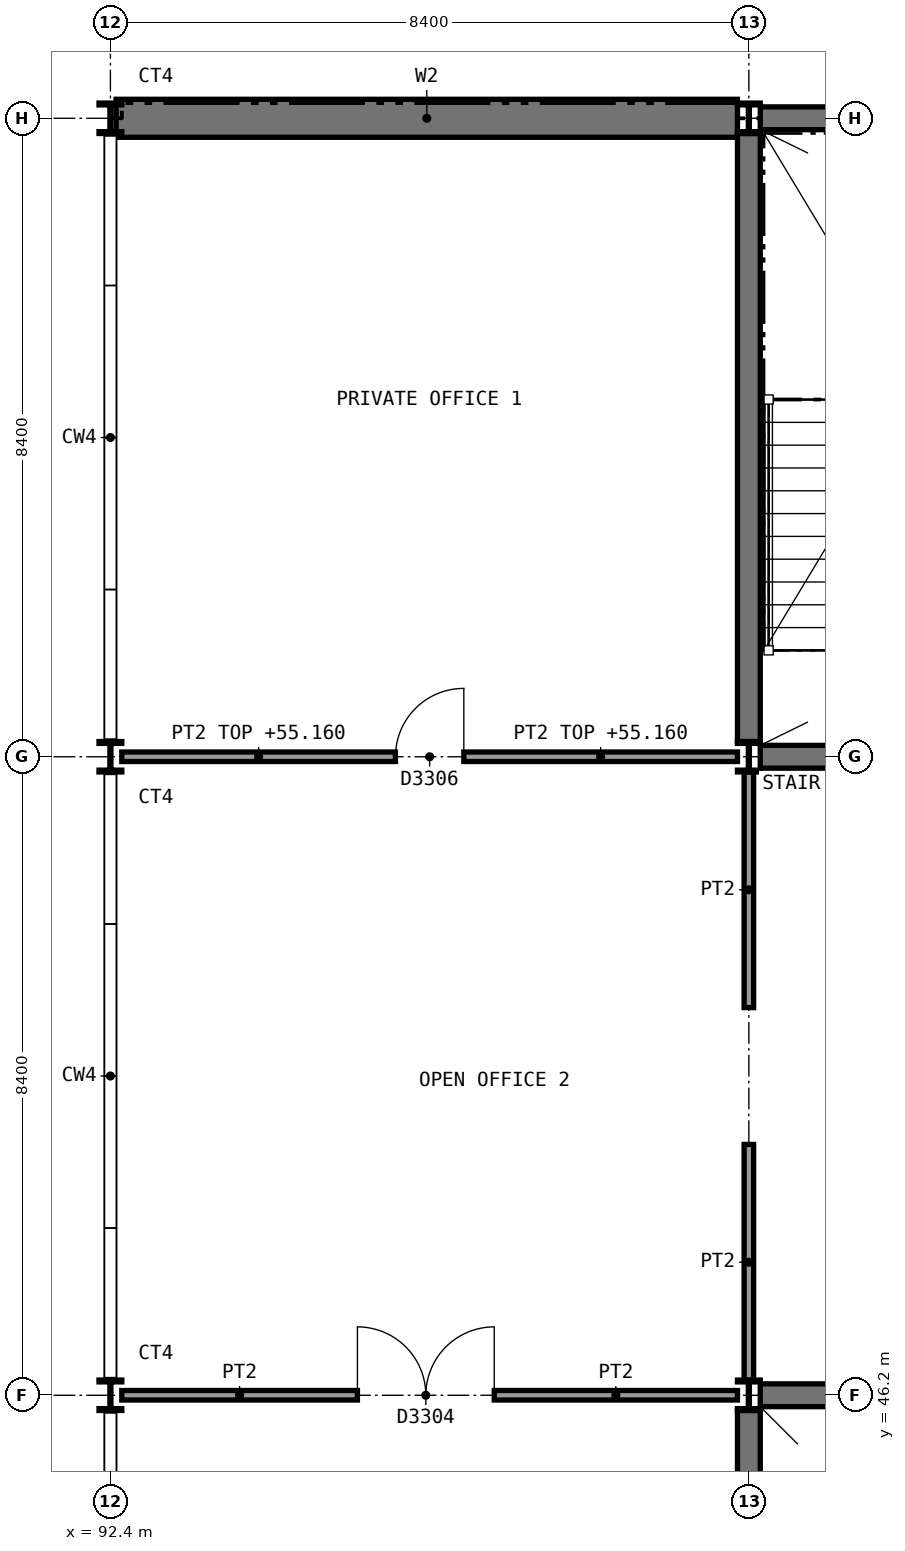
"""IFC4 building model, lengths in metres.
Left out: names, types, materials, properties, quantities, classifications, styles, units other than length and angle.
Written with IfcOpenShell. Run it as: python <this file> out.ifc"""

import sys

from ifc_helpers import new_model, si_unit, direction, frame, frame_2d, origin, origin_2d, place, context, subcontext, project, spatial, rectangle, i_section, extrude, element, fill, save


model = new_model("IFC4")
c1 = context("Model", 3, precision=1e-05, world=origin(), true_north=direction((0.0, 1.0)))
c2 = subcontext(c1, "Body", "Model", "MODEL_VIEW")
j1 = project(units=[si_unit("LENGTHUNIT", "METRE"), si_unit("PLANEANGLEUNIT", "RADIAN")], contexts=[c1])
p1 = place(None, origin())
s1 = spatial("IfcSite", under=j1, at=p1, CompositionType="ELEMENT")
p2 = place(p1, origin())
s2 = spatial("IfcBuilding", under=s1, at=p2, CompositionType="ELEMENT")
p3 = place(p2, frame((0.0, 0.0, 51.6)))
s3 = spatial("IfcBuildingStorey", under=s2, at=p3, CompositionType="ELEMENT", Elevation=51.6)
p4 = place(p3, frame((92.475, 63.0, 0.0), z_axis=(0.0, 0.0, 1.0), x_axis=(1.0, 0.0, 0.0)))
e1 = element("IfcWall", 1, at=p4, inside=s3, PredefinedType="SHEAR", context=c2, shape_type="SweptSolid", body=[
    extrude(rectangle(XDim=8.175, YDim=0.5, at=frame_2d((4.088, 0.0))), origin(), (0.0, 0.0, 1.0), 3.85),
])
p5 = place(p3, frame((100.95, 63.0, 0.0), z_axis=(0.0, 0.0, 1.0), x_axis=(1.0, 0.0, 0.0)))
e2 = element("IfcWall", 2, at=p5, inside=s3, PredefinedType="SHEAR", context=c2, shape_type="SweptSolid", body=[
    extrude(rectangle(XDim=16.45, YDim=0.3, at=frame_2d((8.225, 0.0))), origin(), (0.0, 0.0, 1.0), 3.85),
])
p6 = place(p3, frame((100.95, 54.6, 0.0), z_axis=(0.0, 0.0, 1.0), x_axis=(1.0, 0.0, 0.0)))
e3 = element("IfcWall", 3, at=p6, inside=s3, PredefinedType="SHEAR", context=c2, shape_type="SweptSolid", body=[
    extrude(rectangle(XDim=16.45, YDim=0.3, at=frame_2d((8.225, 0.0))), origin(), (0.0, 0.0, 1.0), 3.85),
])
p7 = place(p6, frame((1.15, 0.0, 0.0)))
e4 = element("IfcOpeningElement", 4, at=p7, cuts=e3, PredefinedType="OPENING", context=c2, shape_type="SweptSolid", body=[
    extrude(rectangle(XDim=1.8, YDim=2.1, at=frame_2d((0.9, 1.05))), frame((0.0, 0.16, 0.0), z_axis=(0.0, -1.0, 0.0), x_axis=(1.0, 0.0, 0.0)), (0.0, 0.0, 1.0), 0.32),
])
p8 = place(p6, frame((13.55, 0.0, 0.0)))
e5 = element("IfcOpeningElement", 5, at=p8, cuts=e3, PredefinedType="OPENING", context=c2, shape_type="SweptSolid", body=[
    extrude(rectangle(XDim=1.8, YDim=2.1, at=frame_2d((0.9, 1.05))), frame((0.0, 0.16, 0.0), z_axis=(0.0, -1.0, 0.0), x_axis=(1.0, 0.0, 0.0)), (0.0, 0.0, 1.0), 0.32),
])
p9 = place(p6, frame((7.05, 0.0, 0.0)))
e6 = element("IfcOpeningElement", 6, at=p9, cuts=e3, PredefinedType="OPENING", context=c2, shape_type="SweptSolid", body=[
    extrude(rectangle(XDim=2.4, YDim=2.4, at=frame_2d((1.2, 1.2))), frame((0.0, 0.16, 0.0), z_axis=(0.0, -1.0, 0.0), x_axis=(1.0, 0.0, 0.0)), (0.0, 0.0, 1.0), 0.32),
])
p10 = place(p3, frame((100.8, 54.8, 0.0), z_axis=(0.0, 0.0, 1.0), x_axis=(0.0, 1.0, 0.0)))
e7 = element("IfcWall", 7, at=p10, inside=s3, PredefinedType="SHEAR", context=c2, shape_type="SweptSolid", body=[
    extrude(rectangle(XDim=8.0, YDim=0.3, at=frame_2d((4.0, 0.0))), origin(), (0.0, 0.0, 1.0), 3.85),
])
p11 = place(p3, frame((100.95, 46.2, 0.0), z_axis=(0.0, 0.0, 1.0), x_axis=(1.0, 0.0, 0.0)))
e8 = element("IfcWall", 8, at=p11, inside=s3, PredefinedType="SHEAR", context=c2, shape_type="SweptSolid", body=[
    extrude(rectangle(XDim=8.1, YDim=0.3, at=frame_2d((4.05, 0.0))), origin(), (0.0, 0.0, 1.0), 3.85),
])
p12 = place(p11, frame((1.15, 0.0, 0.0)))
e9 = element("IfcOpeningElement", 9, at=p12, cuts=e8, PredefinedType="OPENING", context=c2, shape_type="SweptSolid", body=[
    extrude(rectangle(XDim=1.8, YDim=2.1, at=frame_2d((0.9, 1.05))), frame((0.0, 0.16, 0.0), z_axis=(0.0, -1.0, 0.0), x_axis=(1.0, 0.0, 0.0)), (0.0, 0.0, 1.0), 0.32),
])
p13 = place(p11, frame((5.6, 0.0, 0.0)))
e10 = element("IfcOpeningElement", 10, at=p13, cuts=e8, PredefinedType="OPENING", context=c2, shape_type="SweptSolid", body=[
    extrude(rectangle(XDim=1.2, YDim=2.1, at=frame_2d((0.6, 1.05))), frame((0.0, 0.16, 0.0), z_axis=(0.0, -1.0, 0.0), x_axis=(1.0, 0.0, 0.0)), (0.0, 0.0, 1.0), 0.32),
])
p14 = place(p3, frame((100.8, 38.0, 0.0), z_axis=(0.0, 0.0, 1.0), x_axis=(0.0, 1.0, 0.0)))
e11 = element("IfcWall", 11, at=p14, inside=s3, PredefinedType="SHEAR", context=c2, shape_type="SweptSolid", body=[
    extrude(rectangle(XDim=8.0, YDim=0.3, at=frame_2d((4.0, 0.0))), origin(), (0.0, 0.0, 1.0), 3.85),
])
for number, where, z_axis, x_axis in (
    (12, (92.4, 46.2, 0.0), (0.0, 0.0, 1.0), (1.0, 0.0, 0.0)),
    (13, (92.4, 54.6, 0.0), (0.0, 0.0, 1.0), (1.0, 0.0, 0.0)),
    (14, (92.4, 63.0, 0.0), (0.0, 0.0, 1.0), (1.0, 0.0, 0.0)),
    (15, (100.8, 46.2, 0.0), (0.0, 0.0, 1.0), (1.0, 0.0, 0.0)),
    (16, (100.8, 54.6, 0.0), (0.0, 0.0, 1.0), (1.0, 0.0, 0.0)),
    (17, (100.8, 63.0, 0.0), (0.0, 0.0, 1.0), (1.0, 0.0, 0.0)),
):
    element("IfcColumn", number, at=place(p3, frame(where, z_axis=z_axis, x_axis=x_axis)), inside=s3, PredefinedType="COLUMN", context=c2, shape_type="SweptSolid", body=[
        extrude(i_section(OverallWidth=0.3, OverallDepth=0.4, WebThickness=0.013, FlangeThickness=0.024, FilletRadius=0.027, at=origin_2d()), origin(), (0.0, 0.0, 1.0), 4.0),
    ])
p15 = place(p3, frame((92.55, 46.2, 0.0), z_axis=(0.0, 0.0, 1.0), x_axis=(1.0, 0.0, 0.0)))
e18 = element("IfcWall", 18, at=p15, inside=s3, PredefinedType="PARTITIONING", context=c2, shape_type="SweptSolid", body=[
    extrude(rectangle(XDim=8.1, YDim=0.125, at=frame_2d((4.05, 0.0))), origin(), (0.0, 0.0, 1.0), 3.5),
])
p16 = place(p15, frame((3.1, 0.0, 0.0)))
e19 = element("IfcOpeningElement", 19, at=p16, cuts=e18, PredefinedType="OPENING", context=c2, shape_type="SweptSolid", body=[
    extrude(rectangle(XDim=1.8, YDim=2.1, at=frame_2d((0.9, 1.05))), frame((0.0, 0.073, 0.0), z_axis=(0.0, -1.0, 0.0), x_axis=(1.0, 0.0, 0.0)), (0.0, 0.0, 1.0), 0.145),
])
for number, where, z_axis, x_axis in (
    (20, (100.8, 46.4, 0.0), (0.0, 0.0, 1.0), (0.0, 1.0, 0.0)),
    (21, (100.8, 51.3, 0.0), (0.0, 0.0, 1.0), (0.0, 1.0, 0.0)),
):
    element("IfcWall", number, at=place(p3, frame(where, z_axis=z_axis, x_axis=x_axis)), inside=s3, PredefinedType="PARTITIONING", context=c2, shape_type="SweptSolid", body=[
        extrude(rectangle(XDim=3.1, YDim=0.125, at=frame_2d((1.55, 0.0))), origin(), (0.0, 0.0, 1.0), 3.5),
    ])
p17 = place(p3, frame((92.55, 54.6, 0.0), z_axis=(0.0, 0.0, 1.0), x_axis=(1.0, 0.0, 0.0)))
e22 = element("IfcWall", 22, at=p17, inside=s3, PredefinedType="PARTITIONING", context=c2, shape_type="SweptSolid", body=[
    extrude(rectangle(XDim=8.1, YDim=0.125, at=frame_2d((4.05, 0.0))), origin(), (0.0, 0.0, 1.0), 3.56),
])
p18 = place(p17, frame((3.6, 0.0, 0.0)))
e23 = element("IfcOpeningElement", 23, at=p18, cuts=e22, PredefinedType="OPENING", context=c2, shape_type="SweptSolid", body=[
    extrude(rectangle(XDim=0.9, YDim=2.1, at=frame_2d((0.45, 1.05))), frame((0.0, 0.073, 0.0), z_axis=(0.0, -1.0, 0.0), x_axis=(1.0, 0.0, 0.0)), (0.0, 0.0, 1.0), 0.145),
])
p19 = place(p16, origin())
e24 = element("IfcDoor", 24, at=p19, inside=s3, OperationType="DOUBLE_DOOR_SINGLE_SWING", PredefinedType="DOOR", context=c2, shape_type="SweptSolid", body=[
    extrude(rectangle(XDim=1.8, YDim=2.1, at=frame_2d((0.9, 1.05))), frame((0.0, 0.025, 0.0), z_axis=(0.0, -1.0, 0.0), x_axis=(1.0, 0.0, 0.0)), (0.0, 0.0, 1.0), 0.05),
])
fill(e19, e24)
p20 = place(p18, origin())
e25 = element("IfcDoor", 25, at=p20, inside=s3, OperationType="SINGLE_SWING_RIGHT", PredefinedType="DOOR", context=c2, shape_type="SweptSolid", body=[
    extrude(rectangle(XDim=0.9, YDim=2.1, at=frame_2d((0.45, 1.05))), frame((0.0, 0.025, 0.0), z_axis=(0.0, -1.0, 0.0), x_axis=(1.0, 0.0, 0.0)), (0.0, 0.0, 1.0), 0.05),
])
fill(e23, e25)
save(model, sys.argv[1])
